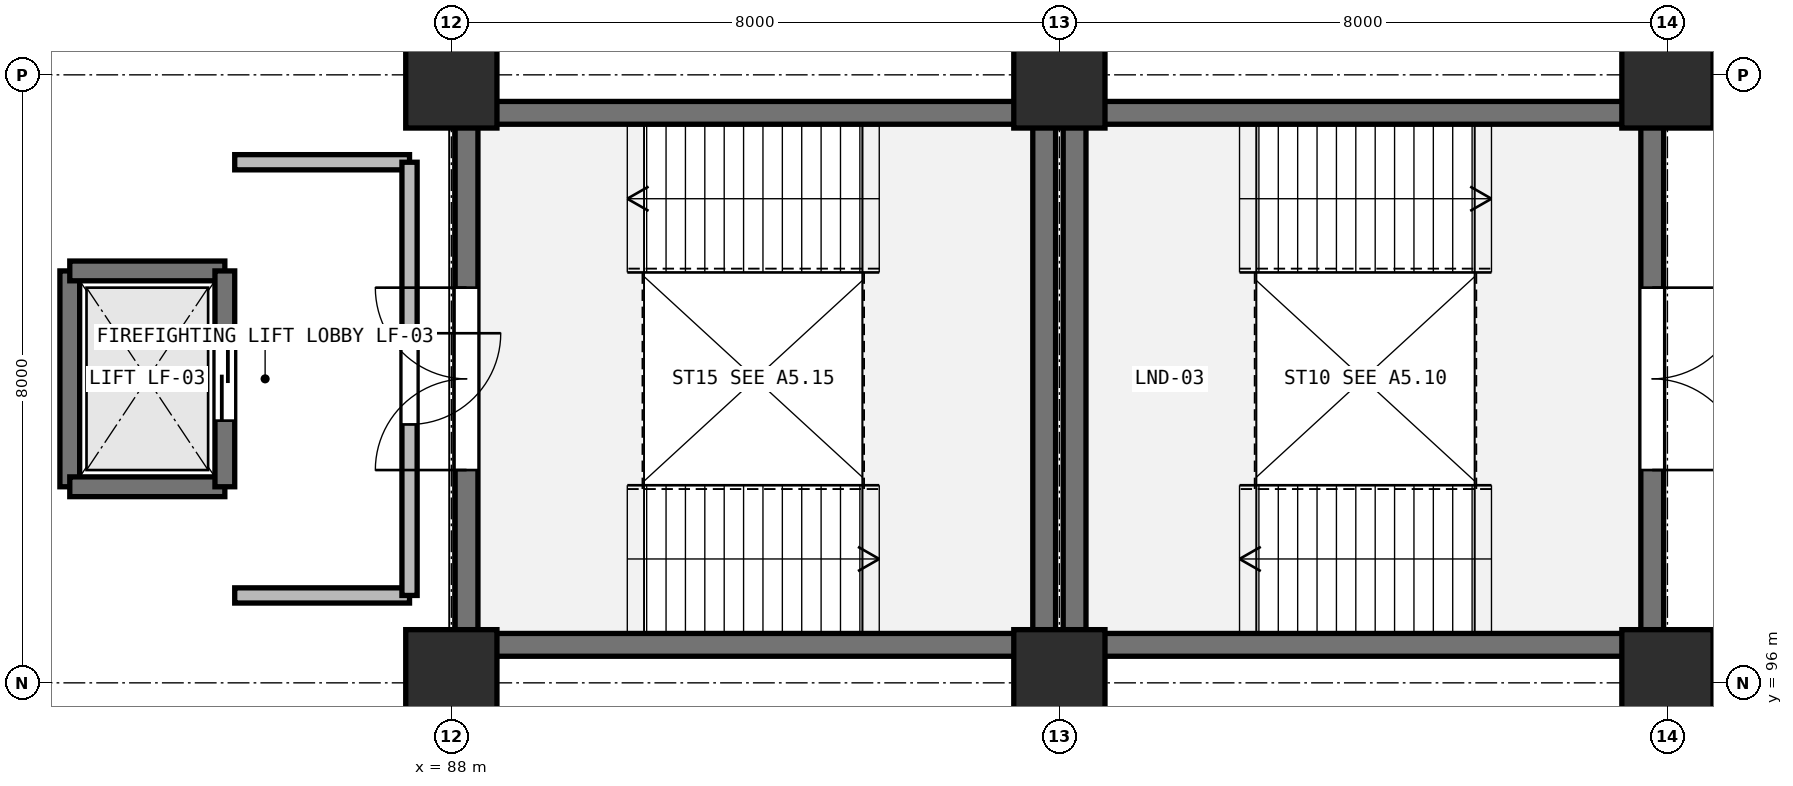
"""IFC4 building model, lengths in metres.
Left out: names, types, materials, properties, quantities, classifications, styles, units other than length and angle.
Written with IfcOpenShell. Run it as: python <this file> out.ifc"""

import sys

from ifc_helpers import new_model, si_unit, direction, frame, frame_2d, origin, origin_2d, place, context, subcontext, project, spatial, rectangle, extrude, element, fill, save


model = new_model("IFC4")
c1 = context("Model", 3, precision=1e-05, world=origin(), true_north=direction((0.0, 1.0)))
c2 = subcontext(c1, "Body", "Model", "MODEL_VIEW")
j1 = project(units=[si_unit("LENGTHUNIT", "METRE"), si_unit("PLANEANGLEUNIT", "RADIAN")], contexts=[c1])
p1 = place(None, origin())
s1 = spatial("IfcSite", under=j1, at=p1, CompositionType="ELEMENT")
p2 = place(p1, origin())
s2 = spatial("IfcBuilding", under=s1, at=p2, CompositionType="ELEMENT")
p3 = place(p2, frame((0.0, 0.0, 5.4)))
s3 = spatial("IfcBuildingStorey", under=s2, at=p3, CompositionType="ELEMENT", Elevation=5.4)
for number, where, z_axis, x_axis in (
    (1, (88.0, 96.0, 0.0), (0.0, 0.0, 1.0), (1.0, 0.0, 0.0)),
    (2, (88.0, 104.0, 0.0), (0.0, 0.0, 1.0), (1.0, 0.0, 0.0)),
    (3, (96.0, 96.0, 0.0), (0.0, 0.0, 1.0), (1.0, 0.0, 0.0)),
    (4, (96.0, 104.0, 0.0), (0.0, 0.0, 1.0), (1.0, 0.0, 0.0)),
    (5, (104.0, 96.0, 0.0), (0.0, 0.0, 1.0), (1.0, 0.0, 0.0)),
    (6, (104.0, 104.0, 0.0), (0.0, 0.0, 1.0), (1.0, 0.0, 0.0)),
):
    element("IfcColumn", number, at=place(p3, frame(where, z_axis=z_axis, x_axis=x_axis)), inside=s3, PredefinedType="COLUMN", context=c2, shape_type="SweptSolid", body=[
        extrude(rectangle(XDim=1.2, YDim=1.4, at=origin_2d()), origin(), (0.0, 0.0, 1.0), 4.8),
    ])
p4 = place(p3, frame((103.8, 96.5, 0.0), z_axis=(0.0, 0.0, 1.0), x_axis=(-1.0, 0.0, 0.0)))
e7 = element("IfcWall", 7, at=p4, inside=s3, PredefinedType="SHEAR", context=c2, shape_type="SweptSolid", body=[
    extrude(rectangle(XDim=7.6, YDim=0.3, at=frame_2d((3.8, 0.0))), origin(), (0.0, 0.0, 1.0), 4.48),
])
p5 = place(p3, frame((96.2, 96.5, 0.0), z_axis=(0.0, 0.0, 1.0), x_axis=(0.0, 1.0, 0.0)))
e8 = element("IfcWall", 8, at=p5, inside=s3, PredefinedType="SHEAR", context=c2, shape_type="SweptSolid", body=[
    extrude(rectangle(XDim=7.0, YDim=0.3, at=frame_2d((3.5, 0.0))), origin(), (0.0, 0.0, 1.0), 4.48),
])
p6 = place(p3, frame((96.2, 103.5, 0.0), z_axis=(0.0, 0.0, 1.0), x_axis=(1.0, 0.0, 0.0)))
e9 = element("IfcWall", 9, at=p6, inside=s3, PredefinedType="SHEAR", context=c2, shape_type="SweptSolid", body=[
    extrude(rectangle(XDim=7.6, YDim=0.3, at=frame_2d((3.8, 0.0))), origin(), (0.0, 0.0, 1.0), 4.48),
])
p7 = place(p3, frame((103.8, 103.5, 0.0), z_axis=(0.0, 0.0, 1.0), x_axis=(0.0, -1.0, 0.0)))
e10 = element("IfcWall", 10, at=p7, inside=s3, PredefinedType="SHEAR", context=c2, shape_type="SweptSolid", body=[
    extrude(rectangle(XDim=7.0, YDim=0.3, at=frame_2d((3.5, 0.0))), origin(), (0.0, 0.0, 1.0), 4.48),
])
p8 = place(p7, frame((2.3, 0.0, 0.0)))
e11 = element("IfcOpeningElement", 11, at=p8, cuts=e10, PredefinedType="OPENING", context=c2, shape_type="SweptSolid", body=[
    extrude(rectangle(XDim=2.4, YDim=2.2, at=frame_2d((1.2, 1.1))), frame((0.0, 0.16, 0.0), z_axis=(0.0, -1.0, 0.0), x_axis=(1.0, 0.0, 0.0)), (0.0, 0.0, 1.0), 0.32),
])
p9 = place(p3, frame((95.8, 96.5, 0.0), z_axis=(0.0, 0.0, 1.0), x_axis=(-1.0, 0.0, 0.0)))
e12 = element("IfcWall", 12, at=p9, inside=s3, PredefinedType="SHEAR", context=c2, shape_type="SweptSolid", body=[
    extrude(rectangle(XDim=7.6, YDim=0.3, at=frame_2d((3.8, 0.0))), origin(), (0.0, 0.0, 1.0), 4.48),
])
p10 = place(p3, frame((88.2, 96.5, 0.0), z_axis=(0.0, 0.0, 1.0), x_axis=(0.0, 1.0, 0.0)))
e13 = element("IfcWall", 13, at=p10, inside=s3, PredefinedType="SHEAR", context=c2, shape_type="SweptSolid", body=[
    extrude(rectangle(XDim=7.0, YDim=0.3, at=frame_2d((3.5, 0.0))), origin(), (0.0, 0.0, 1.0), 4.48),
])
p11 = place(p10, frame((2.3, 0.0, 0.0)))
e14 = element("IfcOpeningElement", 14, at=p11, cuts=e13, PredefinedType="OPENING", context=c2, shape_type="SweptSolid", body=[
    extrude(rectangle(XDim=2.4, YDim=2.2, at=frame_2d((1.2, 1.1))), frame((0.0, 0.16, 0.0), z_axis=(0.0, -1.0, 0.0), x_axis=(1.0, 0.0, 0.0)), (0.0, 0.0, 1.0), 0.32),
])
p12 = place(p3, frame((88.2, 103.5, 0.0), z_axis=(0.0, 0.0, 1.0), x_axis=(1.0, 0.0, 0.0)))
e15 = element("IfcWall", 15, at=p12, inside=s3, PredefinedType="SHEAR", context=c2, shape_type="SweptSolid", body=[
    extrude(rectangle(XDim=7.6, YDim=0.3, at=frame_2d((3.8, 0.0))), origin(), (0.0, 0.0, 1.0), 4.48),
])
p13 = place(p3, frame((95.8, 103.5, 0.0), z_axis=(0.0, 0.0, 1.0), x_axis=(0.0, -1.0, 0.0)))
e16 = element("IfcWall", 16, at=p13, inside=s3, PredefinedType="SHEAR", context=c2, shape_type="SweptSolid", body=[
    extrude(rectangle(XDim=7.0, YDim=0.3, at=frame_2d((3.5, 0.0))), origin(), (0.0, 0.0, 1.0), 4.48),
])
p14 = place(p3, frame((82.98, 98.58, 0.0), z_axis=(0.0, 0.0, 1.0), x_axis=(0.0, 1.0, 0.0)))
e17 = element("IfcWall", 17, at=p14, inside=s3, PredefinedType="SHEAR", context=c2, shape_type="SweptSolid", body=[
    extrude(rectangle(XDim=2.84, YDim=0.26, at=frame_2d((1.42, 0.0))), origin(), (0.0, 0.0, 1.0), 4.48),
])
for number, where, z_axis, x_axis in (
    (18, (82.98, 101.42, 0.0), (0.0, 0.0, 1.0), (1.0, 0.0, 0.0)),
    (19, (85.02, 98.58, 0.0), (0.0, 0.0, 1.0), (-1.0, 0.0, 0.0)),
):
    element("IfcWall", number, at=place(p3, frame(where, z_axis=z_axis, x_axis=x_axis)), inside=s3, PredefinedType="SHEAR", context=c2, shape_type="SweptSolid", body=[
        extrude(rectangle(XDim=2.04, YDim=0.26, at=frame_2d((1.02, 0.0))), origin(), (0.0, 0.0, 1.0), 4.48),
    ])
p15 = place(p3, frame((85.02, 101.42, 0.0), z_axis=(0.0, 0.0, 1.0), x_axis=(0.0, -1.0, 0.0)))
e20 = element("IfcWall", 20, at=p15, inside=s3, PredefinedType="SHEAR", context=c2, shape_type="SweptSolid", body=[
    extrude(rectangle(XDim=2.84, YDim=0.26, at=frame_2d((1.42, 0.0))), origin(), (0.0, 0.0, 1.0), 4.48),
])
p16 = place(p15, frame((0.87, 0.0, 0.0)))
e21 = element("IfcOpeningElement", 21, at=p16, cuts=e20, PredefinedType="OPENING", context=c2, shape_type="SweptSolid", body=[
    extrude(rectangle(XDim=1.1, YDim=2.15, at=frame_2d((0.55, 1.075))), frame((0.0, 0.14, 0.0), z_axis=(0.0, -1.0, 0.0), x_axis=(1.0, 0.0, 0.0)), (0.0, 0.0, 1.0), 0.28),
])
for number, where, z_axis, x_axis in (
    (22, (85.15, 102.85, 0.0), (0.0, 0.0, 1.0), (1.0, 0.0, 0.0)),
    (23, (87.45, 97.15, 0.0), (0.0, 0.0, 1.0), (-1.0, 0.0, 0.0)),
):
    element("IfcWall", number, at=place(p3, frame(where, z_axis=z_axis, x_axis=x_axis)), inside=s3, PredefinedType="PARTITIONING", context=c2, shape_type="SweptSolid", body=[
        extrude(rectangle(XDim=2.3, YDim=0.2, at=frame_2d((1.15, 0.0))), origin(), (0.0, 0.0, 1.0), 4.48),
    ])
p17 = place(p3, frame((87.45, 102.85, 0.0), z_axis=(0.0, 0.0, 1.0), x_axis=(0.0, -1.0, 0.0)))
e24 = element("IfcWall", 24, at=p17, inside=s3, PredefinedType="PARTITIONING", context=c2, shape_type="SweptSolid", body=[
    extrude(rectangle(XDim=5.7, YDim=0.2, at=frame_2d((2.85, 0.0))), origin(), (0.0, 0.0, 1.0), 3.45),
])
p18 = place(p17, frame((2.25, 0.0, 0.0)))
e25 = element("IfcOpeningElement", 25, at=p18, cuts=e24, PredefinedType="OPENING", context=c2, shape_type="SweptSolid", body=[
    extrude(rectangle(XDim=1.2, YDim=2.2, at=frame_2d((0.6, 1.1))), frame((0.0, 0.11, 0.0), z_axis=(0.0, -1.0, 0.0), x_axis=(1.0, 0.0, 0.0)), (0.0, 0.0, 1.0), 0.22),
])
p19 = place(p8, frame((2.4, 0.0, 0.0), z_axis=(0.0, 0.0, 1.0), x_axis=(-1.0, 0.0, 0.0)))
e26 = element("IfcDoor", 26, at=p19, inside=s3, OperationType="DOUBLE_DOOR_SINGLE_SWING", PredefinedType="DOOR", context=c2, shape_type="SweptSolid", body=[
    extrude(rectangle(XDim=2.4, YDim=2.2, at=frame_2d((1.2, 1.1))), frame((0.0, 0.025, 0.0), z_axis=(0.0, -1.0, 0.0), x_axis=(1.0, 0.0, 0.0)), (0.0, 0.0, 1.0), 0.05),
])
fill(e11, e26)
p20 = place(p11, frame((2.4, 0.0, 0.0), z_axis=(0.0, 0.0, 1.0), x_axis=(-1.0, 0.0, 0.0)))
e27 = element("IfcDoor", 27, at=p20, inside=s3, OperationType="DOUBLE_DOOR_SINGLE_SWING", PredefinedType="DOOR", context=c2, shape_type="SweptSolid", body=[
    extrude(rectangle(XDim=2.4, YDim=2.2, at=frame_2d((1.2, 1.1))), frame((0.0, 0.025, 0.0), z_axis=(0.0, -1.0, 0.0), x_axis=(1.0, 0.0, 0.0)), (0.0, 0.0, 1.0), 0.05),
])
fill(e14, e27)
p21 = place(p16, origin())
e28 = element("IfcDoor", 28, at=p21, inside=s3, OperationType="SLIDING_TO_LEFT", PredefinedType="DOOR", context=c2, shape_type="SweptSolid", body=[
    extrude(rectangle(XDim=1.1, YDim=2.15, at=frame_2d((0.55, 1.075))), frame((0.0, 0.025, 0.0), z_axis=(0.0, -1.0, 0.0), x_axis=(1.0, 0.0, 0.0)), (0.0, 0.0, 1.0), 0.05),
])
fill(e21, e28)
p22 = place(p18, origin())
e29 = element("IfcDoor", 29, at=p22, inside=s3, OperationType="SINGLE_SWING_LEFT", PredefinedType="DOOR", context=c2, shape_type="SweptSolid", body=[
    extrude(rectangle(XDim=1.2, YDim=2.2, at=frame_2d((0.6, 1.1))), frame((0.0, 0.025, 0.0), z_axis=(0.0, -1.0, 0.0), x_axis=(1.0, 0.0, 0.0)), (0.0, 0.0, 1.0), 0.05),
])
fill(e25, e29)
save(model, sys.argv[1])
